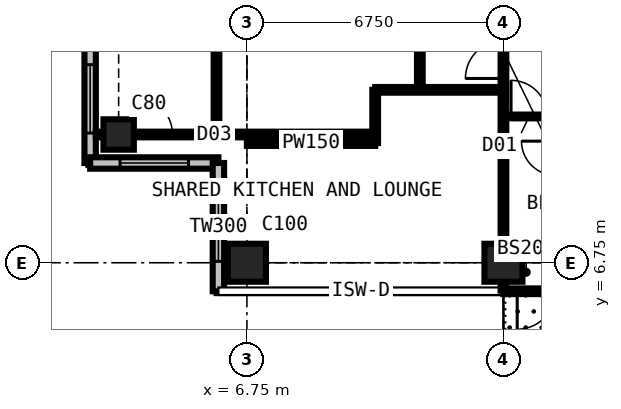
"""IFC4 building model, lengths in metres.
Left out: names, types, materials, properties, quantities, classifications, styles, units other than length and angle.
Written with IfcOpenShell. Run it as: python <this file> out.ifc"""

import sys

from ifc_helpers import new_model, si_unit, direction, frame, frame_2d, origin, origin_2d, place, context, subcontext, project, spatial, rectangle, extrude, element, fill, save


model = new_model("IFC4")
c1 = context("Model", 3, precision=1e-05, world=origin(), true_north=direction((0.0, 1.0)))
c2 = subcontext(c1, "Body", "Model", "MODEL_VIEW")
j1 = project(units=[si_unit("LENGTHUNIT", "METRE"), si_unit("PLANEANGLEUNIT", "RADIAN")], contexts=[c1])
p1 = place(None, origin())
s1 = spatial("IfcSite", under=j1, at=p1, CompositionType="ELEMENT")
p2 = place(p1, origin())
s2 = spatial("IfcBuilding", under=s1, at=p2, CompositionType="ELEMENT")
p3 = place(p2, frame((0.0, 0.0, 247.5)))
s3 = spatial("IfcBuildingStorey", under=s2, at=p3, CompositionType="ELEMENT", Elevation=247.5)
p4 = place(p3, frame((3.375, 10.125, 0.0), z_axis=(0.0, 0.0, 1.0), x_axis=(1.0, 0.0, 0.0)))
e1 = element("IfcColumn", 1, at=p4, inside=s3, PredefinedType="COLUMN", context=c2, shape_type="SweptSolid", body=[
    extrude(rectangle(XDim=0.8, YDim=0.8, at=origin_2d()), origin(), (0.0, 0.0, 1.0), 3.6),
])
for number, where, z_axis, x_axis in (
    (2, (6.75, 6.75, 0.0), (0.0, 0.0, 1.0), (1.0, 0.0, 0.0)),
    (3, (13.5, 6.75, 0.0), (0.0, 0.0, 1.0), (1.0, 0.0, 0.0)),
):
    element("IfcColumn", number, at=place(p3, frame(where, z_axis=z_axis, x_axis=x_axis)), inside=s3, PredefinedType="COLUMN", context=c2, shape_type="SweptSolid", body=[
        extrude(rectangle(XDim=1.0, YDim=1.0, at=origin_2d()), origin(), (0.0, 0.0, 1.0), 3.6),
    ])
p5 = place(p3, frame((2.625, 12.75, 0.0), z_axis=(0.0, 0.0, 1.0), x_axis=(0.0, -1.0, 0.0)))
e4 = element("IfcWall", 4, at=p5, inside=s3, PredefinedType="SOLIDWALL", context=c2, shape_type="SweptSolid", body=[
    extrude(rectangle(XDim=3.375, YDim=0.3, at=frame_2d((1.688, 0.0))), origin(), (0.0, 0.0, 1.0), 3.375),
])
p6 = place(p5, frame((0.788, 0.0, 0.6)))
e5 = element("IfcOpeningElement", 5, at=p6, cuts=e4, PredefinedType="OPENING", context=c2, shape_type="SweptSolid", body=[
    extrude(rectangle(XDim=1.8, YDim=2.1, at=frame_2d((0.9, 1.05))), frame((0.0, 0.16, 0.0), z_axis=(0.0, -1.0, 0.0), x_axis=(1.0, 0.0, 0.0)), (0.0, 0.0, 1.0), 0.32),
])
p7 = place(p3, frame((2.625, 9.375, 0.0), z_axis=(0.0, 0.0, 1.0), x_axis=(1.0, 0.0, 0.0)))
e6 = element("IfcWall", 6, at=p7, inside=s3, PredefinedType="SOLIDWALL", context=c2, shape_type="SweptSolid", body=[
    extrude(rectangle(XDim=3.375, YDim=0.3, at=frame_2d((1.688, 0.0))), origin(), (0.0, 0.0, 1.0), 3.375),
])
p8 = place(p7, frame((0.788, 0.0, 0.6)))
e7 = element("IfcOpeningElement", 7, at=p8, cuts=e6, PredefinedType="OPENING", context=c2, shape_type="SweptSolid", body=[
    extrude(rectangle(XDim=1.8, YDim=2.1, at=frame_2d((0.9, 1.05))), frame((0.0, 0.16, 0.0), z_axis=(0.0, -1.0, 0.0), x_axis=(1.0, 0.0, 0.0)), (0.0, 0.0, 1.0), 0.32),
])
p9 = place(p3, frame((6.0, 9.375, 0.0), z_axis=(0.0, 0.0, 1.0), x_axis=(0.0, -1.0, 0.0)))
e8 = element("IfcWall", 8, at=p9, inside=s3, PredefinedType="SOLIDWALL", context=c2, shape_type="SweptSolid", body=[
    extrude(rectangle(XDim=3.375, YDim=0.3, at=frame_2d((1.688, 0.0))), origin(), (0.0, 0.0, 1.0), 3.375),
])
p10 = place(p9, frame((0.788, 0.0, 0.6)))
e9 = element("IfcOpeningElement", 9, at=p10, cuts=e8, PredefinedType="OPENING", context=c2, shape_type="SweptSolid", body=[
    extrude(rectangle(XDim=1.8, YDim=2.1, at=frame_2d((0.9, 1.05))), frame((0.0, 0.16, 0.0), z_axis=(0.0, -1.0, 0.0), x_axis=(1.0, 0.0, 0.0)), (0.0, 0.0, 1.0), 0.32),
])
p11 = place(p3, frame((20.25, 6.0, 0.0), z_axis=(0.0, 0.0, 1.0), x_axis=(-1.0, 0.0, 0.0)))
e10 = element("IfcWall", 10, at=p11, inside=s3, PredefinedType="SOLIDWALL", context=c2, shape_type="SweptSolid", body=[
    extrude(rectangle(XDim=6.75, YDim=0.15, at=frame_2d((3.375, 0.0))), origin(), (0.0, 0.0, 1.0), 3.375),
])
p12 = place(p11, frame((0.363, 0.0, 0.0)))
e11 = element("IfcOpeningElement", 11, at=p12, cuts=e10, PredefinedType="OPENING", context=c2, shape_type="SweptSolid", body=[
    extrude(rectangle(XDim=1.0, YDim=2.2, at=frame_2d((0.5, 1.1))), frame((0.0, 0.085, 0.0), z_axis=(0.0, -1.0, 0.0), x_axis=(1.0, 0.0, 0.0)), (0.0, 0.0, 1.0), 0.17),
])
p13 = place(p11, frame((1.725, 0.0, 0.9)))
e12 = element("IfcOpeningElement", 12, at=p13, cuts=e10, PredefinedType="OPENING", context=c2, shape_type="SweptSolid", body=[
    extrude(rectangle(XDim=1.2, YDim=1.8, at=frame_2d((0.6, 0.9))), frame((0.0, 0.085, 0.0), z_axis=(0.0, -1.0, 0.0), x_axis=(1.0, 0.0, 0.0)), (0.0, 0.0, 1.0), 0.17),
])
p14 = place(p11, frame((5.387, 0.0, 0.0)))
e13 = element("IfcOpeningElement", 13, at=p14, cuts=e10, PredefinedType="OPENING", context=c2, shape_type="SweptSolid", body=[
    extrude(rectangle(XDim=1.0, YDim=2.2, at=frame_2d((0.5, 1.1))), frame((0.0, 0.085, 0.0), z_axis=(0.0, -1.0, 0.0), x_axis=(1.0, 0.0, 0.0)), (0.0, 0.0, 1.0), 0.17),
])
p15 = place(p11, frame((3.825, 0.0, 0.9)))
e14 = element("IfcOpeningElement", 14, at=p15, cuts=e10, PredefinedType="OPENING", context=c2, shape_type="SweptSolid", body=[
    extrude(rectangle(XDim=1.2, YDim=1.8, at=frame_2d((0.6, 0.9))), frame((0.0, 0.085, 0.0), z_axis=(0.0, -1.0, 0.0), x_axis=(1.0, 0.0, 0.0)), (0.0, 0.0, 1.0), 0.17),
])
p16 = place(p3, frame((2.775, 10.125, 0.0), z_axis=(0.0, 0.0, 1.0), x_axis=(1.0, 0.0, 0.0)))
e15 = element("IfcWall", 15, at=p16, inside=s3, PredefinedType="PARTITIONING", context=c2, shape_type="SweptSolid", body=[
    extrude(rectangle(XDim=7.35, YDim=0.15, at=frame_2d((3.675, 0.0))), origin(), (0.0, 0.0, 1.0), 2.877),
])
p17 = place(p16, frame((1.016, 0.0, 0.0)))
e16 = element("IfcOpeningElement", 16, at=p17, cuts=e15, PredefinedType="OPENING", context=c2, shape_type="SweptSolid", body=[
    extrude(rectangle(XDim=1.0, YDim=2.2, at=frame_2d((0.5, 1.1))), frame((0.0, 0.085, 0.0), z_axis=(0.0, -1.0, 0.0), x_axis=(1.0, 0.0, 0.0)), (0.0, 0.0, 1.0), 0.17),
])
p18 = place(p3, frame((5.95, 10.125, 0.0), z_axis=(0.0, 0.0, 1.0), x_axis=(0.0, 1.0, 0.0)))
e17 = element("IfcWall", 17, at=p18, inside=s3, PredefinedType="PARTITIONING", context=c2, shape_type="SweptSolid", body=[
    extrude(rectangle(XDim=2.65, YDim=0.15, at=frame_2d((1.325, 0.0))), origin(), (0.0, 0.0, 1.0), 3.375),
])
p19 = place(p3, frame((6.75, 9.9, 0.0), z_axis=(0.0, 0.0, 1.0), x_axis=(1.0, 0.0, 0.0)))
e18 = element("IfcWall", 18, at=p19, inside=s3, PredefinedType="PARTITIONING", context=c2, shape_type="SweptSolid", body=[
    extrude(rectangle(XDim=3.375, YDim=0.15, at=frame_2d((1.688, 0.0))), origin(), (0.0, 0.0, 1.0), 3.375),
])
p20 = place(p3, frame((10.125, 9.9, 0.0), z_axis=(0.0, 0.0, 1.0), x_axis=(0.0, 1.0, 0.0)))
e19 = element("IfcWall", 19, at=p20, inside=s3, PredefinedType="PARTITIONING", context=c2, shape_type="SweptSolid", body=[
    extrude(rectangle(XDim=1.4, YDim=0.15, at=frame_2d((0.7, 0.0))), origin(), (0.0, 0.0, 1.0), 3.375),
])
p21 = place(p3, frame((10.125, 11.3, 0.0), z_axis=(0.0, 0.0, 1.0), x_axis=(1.0, 0.0, 0.0)))
e20 = element("IfcWall", 20, at=p21, inside=s3, PredefinedType="PARTITIONING", context=c2, shape_type="SweptSolid", body=[
    extrude(rectangle(XDim=3.375, YDim=0.15, at=frame_2d((1.688, 0.0))), origin(), (0.0, 0.0, 1.0), 3.375),
])
p22 = place(p3, frame((11.3, 11.3, 0.0), z_axis=(0.0, 0.0, 1.0), x_axis=(0.0, 1.0, 0.0)))
e21 = element("IfcWall", 21, at=p22, inside=s3, PredefinedType="PARTITIONING", context=c2, shape_type="SweptSolid", body=[
    extrude(rectangle(XDim=19.3, YDim=0.15, at=frame_2d((9.65, 0.0))), origin(), (0.0, 0.0, 1.0), 3.375),
])
p23 = place(p22, frame((18.1, 0.0, 0.0)))
e22 = element("IfcOpeningElement", 22, at=p23, cuts=e21, PredefinedType="OPENING", context=c2, shape_type="SweptSolid", body=[
    extrude(rectangle(XDim=1.0, YDim=2.2, at=frame_2d((0.5, 1.1))), frame((0.0, 0.085, 0.0), z_axis=(0.0, -1.0, 0.0), x_axis=(1.0, 0.0, 0.0)), (0.0, 0.0, 1.0), 0.17),
])
p24 = place(p22, frame((10.137, 0.0, 0.0)))
e23 = element("IfcOpeningElement", 23, at=p24, cuts=e21, PredefinedType="OPENING", context=c2, shape_type="SweptSolid", body=[
    extrude(rectangle(XDim=1.0, YDim=2.2, at=frame_2d((0.5, 1.1))), frame((0.0, 0.085, 0.0), z_axis=(0.0, -1.0, 0.0), x_axis=(1.0, 0.0, 0.0)), (0.0, 0.0, 1.0), 0.17),
])
p25 = place(p3, frame((13.5, 6.016, 0.0), z_axis=(0.0, 0.0, 1.0), x_axis=(0.0, 1.0, 0.0)))
e24 = element("IfcWall", 24, at=p25, inside=s3, PredefinedType="PARTITIONING", context=c2, shape_type="SweptSolid", body=[
    extrude(rectangle(XDim=6.884, YDim=0.15, at=frame_2d((3.442, 0.0))), origin(), (0.0, 0.0, 1.0), 2.61),
])
p26 = place(p25, frame((5.584, 0.0, 0.0)))
e25 = element("IfcOpeningElement", 25, at=p26, cuts=e24, PredefinedType="OPENING", context=c2, shape_type="SweptSolid", body=[
    extrude(rectangle(XDim=1.0, YDim=2.2, at=frame_2d((0.5, 1.1))), frame((0.0, 0.085, 0.0), z_axis=(0.0, -1.0, 0.0), x_axis=(1.0, 0.0, 0.0)), (0.0, 0.0, 1.0), 0.17),
])
p27 = place(p3, frame((13.5, 10.6, 0.0), z_axis=(0.0, 0.0, 1.0), x_axis=(1.0, 0.0, 0.0)))
e26 = element("IfcWall", 26, at=p27, inside=s3, PredefinedType="PARTITIONING", context=c2, shape_type="SweptSolid", body=[
    extrude(rectangle(XDim=10.125, YDim=0.1, at=frame_2d((5.062, 0.0))), origin(), (0.0, 0.0, 1.0), 3.375),
])
p28 = place(p27, frame((0.2, 0.0, 0.0)))
e27 = element("IfcOpeningElement", 27, at=p28, cuts=e26, PredefinedType="OPENING", context=c2, shape_type="SweptSolid", body=[
    extrude(rectangle(XDim=0.95, YDim=2.2, at=frame_2d((0.475, 1.1))), frame((0.0, 0.06, 0.0), z_axis=(0.0, -1.0, 0.0), x_axis=(1.0, 0.0, 0.0)), (0.0, 0.0, 1.0), 0.12),
])
p29 = place(p27, frame((3.625, 0.0, 0.0)))
e28 = element("IfcOpeningElement", 28, at=p29, cuts=e26, PredefinedType="OPENING", context=c2, shape_type="SweptSolid", body=[
    extrude(rectangle(XDim=0.95, YDim=2.2, at=frame_2d((0.475, 1.1))), frame((0.0, 0.06, 0.0), z_axis=(0.0, -1.0, 0.0), x_axis=(1.0, 0.0, 0.0)), (0.0, 0.0, 1.0), 0.12),
])
p30 = place(p27, frame((6.95, 0.0, 0.0)))
e29 = element("IfcOpeningElement", 29, at=p30, cuts=e26, PredefinedType="OPENING", context=c2, shape_type="SweptSolid", body=[
    extrude(rectangle(XDim=0.95, YDim=2.2, at=frame_2d((0.475, 1.1))), frame((0.0, 0.06, 0.0), z_axis=(0.0, -1.0, 0.0), x_axis=(1.0, 0.0, 0.0)), (0.0, 0.0, 1.0), 0.12),
])
p31 = place(p6, origin())
e30 = element("IfcWindow", 30, at=p31, inside=s3, PartitioningType="SINGLE_PANEL", PredefinedType="WINDOW", context=c2, shape_type="SweptSolid", body=[
    extrude(rectangle(XDim=1.8, YDim=2.1, at=frame_2d((0.9, 1.05))), frame((0.0, 0.03, 0.0), z_axis=(0.0, -1.0, 0.0), x_axis=(1.0, 0.0, 0.0)), (0.0, 0.0, 1.0), 0.06),
])
fill(e5, e30)
p32 = place(p8, origin())
e31 = element("IfcWindow", 31, at=p32, inside=s3, PartitioningType="SINGLE_PANEL", PredefinedType="WINDOW", context=c2, shape_type="SweptSolid", body=[
    extrude(rectangle(XDim=1.8, YDim=2.1, at=frame_2d((0.9, 1.05))), frame((0.0, 0.03, 0.0), z_axis=(0.0, -1.0, 0.0), x_axis=(1.0, 0.0, 0.0)), (0.0, 0.0, 1.0), 0.06),
])
fill(e7, e31)
p33 = place(p10, origin())
e32 = element("IfcWindow", 32, at=p33, inside=s3, PartitioningType="SINGLE_PANEL", PredefinedType="WINDOW", context=c2, shape_type="SweptSolid", body=[
    extrude(rectangle(XDim=1.8, YDim=2.1, at=frame_2d((0.9, 1.05))), frame((0.0, 0.03, 0.0), z_axis=(0.0, -1.0, 0.0), x_axis=(1.0, 0.0, 0.0)), (0.0, 0.0, 1.0), 0.06),
])
fill(e9, e32)
p34 = place(p14, origin())
e33 = element("IfcDoor", 33, at=p34, inside=s3, OperationType="SINGLE_SWING_RIGHT", PredefinedType="DOOR", context=c2, shape_type="SweptSolid", body=[
    extrude(rectangle(XDim=1.0, YDim=2.2, at=frame_2d((0.5, 1.1))), frame((0.0, 0.025, 0.0), z_axis=(0.0, -1.0, 0.0), x_axis=(1.0, 0.0, 0.0)), (0.0, 0.0, 1.0), 0.05),
])
fill(e13, e33)
p35 = place(p17, origin())
e34 = element("IfcDoor", 34, at=p35, inside=s3, OperationType="SINGLE_SWING_LEFT", PredefinedType="DOOR", context=c2, shape_type="SweptSolid", body=[
    extrude(rectangle(XDim=1.0, YDim=2.2, at=frame_2d((0.5, 1.1))), frame((0.0, 0.025, 0.0), z_axis=(0.0, -1.0, 0.0), x_axis=(1.0, 0.0, 0.0)), (0.0, 0.0, 1.0), 0.05),
])
fill(e16, e34)
p36 = place(p28, origin())
e35 = element("IfcDoor", 35, at=p36, inside=s3, OperationType="SINGLE_SWING_LEFT", PredefinedType="DOOR", context=c2, shape_type="SweptSolid", body=[
    extrude(rectangle(XDim=0.95, YDim=2.2, at=frame_2d((0.475, 1.1))), frame((0.0, 0.025, 0.0), z_axis=(0.0, -1.0, 0.0), x_axis=(1.0, 0.0, 0.0)), (0.0, 0.0, 1.0), 0.05),
])
fill(e27, e35)
p37 = place(p26, origin())
e36 = element("IfcDoor", 36, at=p37, inside=s3, OperationType="SINGLE_SWING_LEFT", PredefinedType="DOOR", context=c2, shape_type="SweptSolid", body=[
    extrude(rectangle(XDim=1.0, YDim=2.2, at=frame_2d((0.5, 1.1))), frame((0.0, 0.025, 0.0), z_axis=(0.0, -1.0, 0.0), x_axis=(1.0, 0.0, 0.0)), (0.0, 0.0, 1.0), 0.05),
])
fill(e25, e36)
save(model, sys.argv[1])
